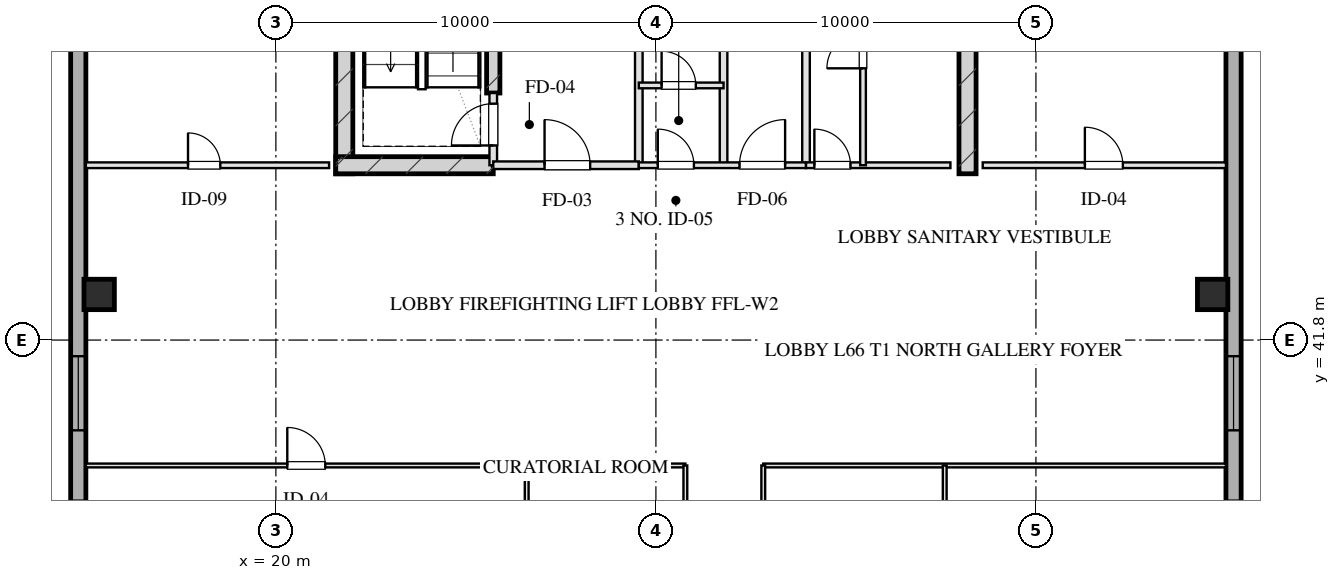
"""IFC4 building model, lengths in metres.
Left out: names, types, materials, properties, quantities, classifications, styles, units other than length and angle.
Written with IfcOpenShell. Run it as: python <this file> out.ifc"""

import sys

from ifc_helpers import new_model, si_unit, direction, frame, frame_2d, origin, origin_2d, place, context, subcontext, project, spatial, rectangle, hollow_rectangle, extrude, element, fill, save


model = new_model("IFC4")
c1 = context("Model", 3, precision=1e-05, world=origin(), true_north=direction((0.0, 1.0)))
c2 = subcontext(c1, "Body", "Model", "MODEL_VIEW")
j1 = project(units=[si_unit("LENGTHUNIT", "METRE"), si_unit("PLANEANGLEUNIT", "RADIAN")], contexts=[c1])
p1 = place(None, origin())
s1 = spatial("IfcSite", under=j1, at=p1, CompositionType="ELEMENT")
p2 = place(p1, origin())
s2 = spatial("IfcBuilding", under=s1, at=p2, CompositionType="ELEMENT")
p3 = place(p2, frame((0.0, 0.0, 244.0)))
s3 = spatial("IfcBuildingStorey", under=s2, at=p3, CompositionType="ELEMENT", Elevation=244.0)
for number, where, z_axis, x_axis in (
    (1, (21.8, 46.175, 0.0), (0.0, 0.0, 1.0), (0.0, 1.0, 0.0)),
    (2, (38.2, 46.175, 0.0), (0.0, 0.0, 1.0), (0.0, 1.0, 0.0)),
):
    element("IfcWall", number, at=place(p3, frame(where, z_axis=z_axis, x_axis=x_axis)), inside=s3, PredefinedType="SHEAR", context=c2, shape_type="SweptSolid", body=[
        extrude(rectangle(XDim=9.33, YDim=0.45, at=frame_2d((4.665, 0.0))), origin(), (0.0, 0.0, 1.0), 3.2),
    ])
p4 = place(p3, frame((25.72, 48.3, 0.0), z_axis=(0.0, 0.0, 1.0), x_axis=(0.0, 1.0, 0.0)))
e3 = element("IfcWall", 3, at=p4, inside=s3, PredefinedType="SHEAR", context=c2, shape_type="SweptSolid", body=[
    extrude(rectangle(XDim=6.98, YDim=0.35, at=frame_2d((3.49, 0.0))), origin(), (0.0, 0.0, 1.0), 3.2),
])
p5 = place(p3, frame((21.575, 46.4, 0.0), z_axis=(0.0, 0.0, 1.0), x_axis=(1.0, 0.0, 0.0)))
e4 = element("IfcWall", 4, at=p5, inside=s3, PredefinedType="SHEAR", context=c2, shape_type="SweptSolid", body=[
    extrude(rectangle(XDim=4.145, YDim=0.45, at=frame_2d((2.073, 0.0))), origin(), (0.0, 0.0, 1.0), 3.2),
])
for number, where, z_axis, x_axis in (
    (5, (15.35, 43.0, 0.0), (0.0, 0.0, 1.0), (1.0, 0.0, 0.0)),
    (6, (44.65, 43.0, 0.0), (0.0, 0.0, 1.0), (1.0, 0.0, 0.0)),
):
    element("IfcColumn", number, at=place(p3, frame(where, z_axis=z_axis, x_axis=x_axis)), inside=s3, PredefinedType="COLUMN", context=c2, shape_type="SweptSolid", body=[
        extrude(hollow_rectangle(XDim=0.8, YDim=0.8, WallThickness=0.028, at=origin_2d()), origin(), (0.0, 0.0, 1.0), 3.201),
    ])
p6 = place(p3, frame((14.8, 13.1, 0.0), z_axis=(0.0, 0.0, 1.0), x_axis=(0.0, 1.0, 0.0)))
e7 = element("IfcWall", 7, at=p6, inside=s3, PredefinedType="SOLIDWALL", context=c2, shape_type="SweptSolid", body=[
    extrude(rectangle(XDim=41.8, YDim=0.4, at=frame_2d((20.9, 0.0))), origin(), (0.0, 0.0, 1.0), 2.36),
])
p7 = place(p6, frame((13.525, 0.0, 0.75)))
e8 = element("IfcOpeningElement", 8, at=p7, cuts=e7, PredefinedType="OPENING", context=c2, shape_type="SweptSolid", body=[
    extrude(rectangle(XDim=1.95, YDim=1.21, at=frame_2d((0.975, 0.605))), frame((0.0, 0.21, 0.0), z_axis=(0.0, -1.0, 0.0), x_axis=(1.0, 0.0, 0.0)), (0.0, 0.0, 1.0), 0.42),
])
p8 = place(p6, frame((17.325, 0.0, 0.75)))
e9 = element("IfcOpeningElement", 9, at=p8, cuts=e7, PredefinedType="OPENING", context=c2, shape_type="SweptSolid", body=[
    extrude(rectangle(XDim=1.95, YDim=1.21, at=frame_2d((0.975, 0.605))), frame((0.0, 0.21, 0.0), z_axis=(0.0, -1.0, 0.0), x_axis=(1.0, 0.0, 0.0)), (0.0, 0.0, 1.0), 0.42),
])
p9 = place(p6, frame((22.525, 0.0, 0.75)))
e10 = element("IfcOpeningElement", 10, at=p9, cuts=e7, PredefinedType="OPENING", context=c2, shape_type="SweptSolid", body=[
    extrude(rectangle(XDim=1.95, YDim=1.21, at=frame_2d((0.975, 0.605))), frame((0.0, 0.21, 0.0), z_axis=(0.0, -1.0, 0.0), x_axis=(1.0, 0.0, 0.0)), (0.0, 0.0, 1.0), 0.42),
])
p10 = place(p6, frame((26.325, 0.0, 0.75)))
e11 = element("IfcOpeningElement", 11, at=p10, cuts=e7, PredefinedType="OPENING", context=c2, shape_type="SweptSolid", body=[
    extrude(rectangle(XDim=1.95, YDim=1.21, at=frame_2d((0.975, 0.605))), frame((0.0, 0.21, 0.0), z_axis=(0.0, -1.0, 0.0), x_axis=(1.0, 0.0, 0.0)), (0.0, 0.0, 1.0), 0.42),
])
p11 = place(p3, frame((45.2, 54.9, 0.0), z_axis=(0.0, 0.0, 1.0), x_axis=(0.0, -1.0, 0.0)))
e12 = element("IfcWall", 12, at=p11, inside=s3, PredefinedType="SOLIDWALL", context=c2, shape_type="SweptSolid", body=[
    extrude(rectangle(XDim=41.8, YDim=0.4, at=frame_2d((20.9, 0.0))), origin(), (0.0, 0.0, 1.0), 2.36),
])
p12 = place(p11, frame((26.325, 0.0, 0.75)))
e13 = element("IfcOpeningElement", 13, at=p12, cuts=e12, PredefinedType="OPENING", context=c2, shape_type="SweptSolid", body=[
    extrude(rectangle(XDim=1.95, YDim=1.21, at=frame_2d((0.975, 0.605))), frame((0.0, 0.21, 0.0), z_axis=(0.0, -1.0, 0.0), x_axis=(1.0, 0.0, 0.0)), (0.0, 0.0, 1.0), 0.42),
])
p13 = place(p11, frame((22.525, 0.0, 0.75)))
e14 = element("IfcOpeningElement", 14, at=p13, cuts=e12, PredefinedType="OPENING", context=c2, shape_type="SweptSolid", body=[
    extrude(rectangle(XDim=1.95, YDim=1.21, at=frame_2d((0.975, 0.605))), frame((0.0, 0.21, 0.0), z_axis=(0.0, -1.0, 0.0), x_axis=(1.0, 0.0, 0.0)), (0.0, 0.0, 1.0), 0.42),
])
p14 = place(p11, frame((17.325, 0.0, 0.75)))
e15 = element("IfcOpeningElement", 15, at=p14, cuts=e12, PredefinedType="OPENING", context=c2, shape_type="SweptSolid", body=[
    extrude(rectangle(XDim=1.95, YDim=1.21, at=frame_2d((0.975, 0.605))), frame((0.0, 0.21, 0.0), z_axis=(0.0, -1.0, 0.0), x_axis=(1.0, 0.0, 0.0)), (0.0, 0.0, 1.0), 0.42),
])
p15 = place(p11, frame((13.525, 0.0, 0.75)))
e16 = element("IfcOpeningElement", 16, at=p15, cuts=e12, PredefinedType="OPENING", context=c2, shape_type="SweptSolid", body=[
    extrude(rectangle(XDim=1.95, YDim=1.21, at=frame_2d((0.975, 0.605))), frame((0.0, 0.21, 0.0), z_axis=(0.0, -1.0, 0.0), x_axis=(1.0, 0.0, 0.0)), (0.0, 0.0, 1.0), 0.42),
])
p16 = place(p3, frame((25.72, 46.4, 0.0), z_axis=(0.0, 0.0, 1.0), x_axis=(0.0, 1.0, 0.0)))
e17 = element("IfcWall", 17, at=p16, inside=s3, PredefinedType="PARTITIONING", context=c2, shape_type="SweptSolid", body=[
    extrude(rectangle(XDim=1.9, YDim=0.2, at=frame_2d((0.95, 0.0))), origin(), (0.0, 0.0, 1.0), 2.925),
])
p17 = place(p16, frame((0.52, 0.0, 0.0)))
e18 = element("IfcOpeningElement", 18, at=p17, cuts=e17, PredefinedType="OPENING", context=c2, shape_type="SweptSolid", body=[
    extrude(rectangle(XDim=1.1, YDim=2.05, at=frame_2d((0.55, 1.025))), frame((0.0, 0.11, 0.0), z_axis=(0.0, -1.0, 0.0), x_axis=(1.0, 0.0, 0.0)), (0.0, 0.0, 1.0), 0.22),
])
p18 = place(p3, frame((29.55, 46.4, 0.0), z_axis=(0.0, 0.0, 1.0), x_axis=(0.0, 1.0, 0.0)))
e19 = element("IfcWall", 19, at=p18, inside=s3, PredefinedType="PARTITIONING", context=c2, shape_type="SweptSolid", body=[
    extrude(rectangle(XDim=8.43, YDim=0.2, at=frame_2d((4.215, 0.0))), origin(), (0.0, 0.0, 1.0), 2.925),
])
p19 = place(p3, frame((25.72, 46.4, 0.0), z_axis=(0.0, 0.0, 1.0), x_axis=(1.0, 0.0, 0.0)))
e20 = element("IfcWall", 20, at=p19, inside=s3, PredefinedType="PARTITIONING", context=c2, shape_type="SweptSolid", body=[
    extrude(rectangle(XDim=3.83, YDim=0.2, at=frame_2d((1.915, 0.0))), origin(), (0.0, 0.0, 1.0), 2.925),
])
p20 = place(p19, frame((1.35, 0.0, 0.0)))
e21 = element("IfcOpeningElement", 21, at=p20, cuts=e20, PredefinedType="OPENING", context=c2, shape_type="SweptSolid", body=[
    extrude(rectangle(XDim=1.2, YDim=2.05, at=frame_2d((0.6, 1.025))), frame((0.0, 0.11, 0.0), z_axis=(0.0, -1.0, 0.0), x_axis=(1.0, 0.0, 0.0)), (0.0, 0.0, 1.0), 0.22),
])
for number, where, z_axis, x_axis in (
    (22, (33.95, 46.4, 0.0), (0.0, 0.0, 1.0), (0.0, 1.0, 0.0)),
    (23, (31.78, 46.4, 0.0), (0.0, 0.0, 1.0), (0.0, 1.0, 0.0)),
):
    element("IfcWall", number, at=place(p3, frame(where, z_axis=z_axis, x_axis=x_axis)), inside=s3, PredefinedType="PARTITIONING", context=c2, shape_type="SweptSolid", body=[
        extrude(rectangle(XDim=8.43, YDim=0.2, at=frame_2d((4.215, 0.0))), origin(), (0.0, 0.0, 1.0), 2.925),
    ])
p21 = place(p3, frame((29.55, 46.4, 0.0), z_axis=(0.0, 0.0, 1.0), x_axis=(1.0, 0.0, 0.0)))
e24 = element("IfcWall", 24, at=p21, inside=s3, PredefinedType="PARTITIONING", context=c2, shape_type="SweptSolid", body=[
    extrude(rectangle(XDim=4.4, YDim=0.15, at=frame_2d((2.2, 0.0))), origin(), (0.0, 0.0, 1.0), 2.925),
])
p22 = place(p21, frame((0.5, 0.0, 0.0)))
e25 = element("IfcOpeningElement", 25, at=p22, cuts=e24, PredefinedType="OPENING", context=c2, shape_type="SweptSolid", body=[
    extrude(rectangle(XDim=0.95, YDim=2.05, at=frame_2d((0.475, 1.025))), frame((0.0, 0.085, 0.0), z_axis=(0.0, -1.0, 0.0), x_axis=(1.0, 0.0, 0.0)), (0.0, 0.0, 1.0), 0.17),
])
p23 = place(p21, frame((2.65, 0.0, 0.0)))
e26 = element("IfcOpeningElement", 26, at=p23, cuts=e24, PredefinedType="OPENING", context=c2, shape_type="SweptSolid", body=[
    extrude(rectangle(XDim=1.2, YDim=2.05, at=frame_2d((0.6, 1.025))), frame((0.0, 0.085, 0.0), z_axis=(0.0, -1.0, 0.0), x_axis=(1.0, 0.0, 0.0)), (0.0, 0.0, 1.0), 0.17),
])
p24 = place(p3, frame((29.55, 48.5, 0.0), z_axis=(0.0, 0.0, 1.0), x_axis=(1.0, 0.0, 0.0)))
e27 = element("IfcWall", 27, at=p24, inside=s3, PredefinedType="PARTITIONING", context=c2, shape_type="SweptSolid", body=[
    extrude(rectangle(XDim=2.23, YDim=0.15, at=frame_2d((1.115, 0.0))), origin(), (0.0, 0.0, 1.0), 2.925),
])
p25 = place(p24, frame((0.6, 0.0, 0.0)))
e28 = element("IfcOpeningElement", 28, at=p25, cuts=e27, PredefinedType="OPENING", context=c2, shape_type="SweptSolid", body=[
    extrude(rectangle(XDim=0.9, YDim=2.05, at=frame_2d((0.45, 1.025))), frame((0.0, 0.085, 0.0), z_axis=(0.0, -1.0, 0.0), x_axis=(1.0, 0.0, 0.0)), (0.0, 0.0, 1.0), 0.17),
])
p26 = place(p3, frame((33.95, 46.4, 0.0), z_axis=(0.0, 0.0, 1.0), x_axis=(1.0, 0.0, 0.0)))
e29 = element("IfcWall", 29, at=p26, inside=s3, PredefinedType="PARTITIONING", context=c2, shape_type="SweptSolid", body=[
    extrude(rectangle(XDim=3.8, YDim=0.15, at=frame_2d((1.9, 0.0))), origin(), (0.0, 0.0, 1.0), 2.925),
])
p27 = place(p26, frame((0.22, 0.0, 0.0)))
e30 = element("IfcOpeningElement", 30, at=p27, cuts=e29, PredefinedType="OPENING", context=c2, shape_type="SweptSolid", body=[
    extrude(rectangle(XDim=0.95, YDim=2.05, at=frame_2d((0.475, 1.025))), frame((0.0, 0.085, 0.0), z_axis=(0.0, -1.0, 0.0), x_axis=(1.0, 0.0, 0.0)), (0.0, 0.0, 1.0), 0.17),
])
p28 = place(p3, frame((35.45, 46.4, 0.0), z_axis=(0.0, 0.0, 1.0), x_axis=(0.0, 1.0, 0.0)))
e31 = element("IfcWall", 31, at=p28, inside=s3, PredefinedType="PARTITIONING", context=c2, shape_type="SweptSolid", body=[
    extrude(rectangle(XDim=8.43, YDim=0.15, at=frame_2d((4.215, 0.0))), origin(), (0.0, 0.0, 1.0), 2.515),
])
p29 = place(p28, frame((2.55, 0.0, 0.0)))
e32 = element("IfcOpeningElement", 32, at=p29, cuts=e31, PredefinedType="OPENING", context=c2, shape_type="SweptSolid", body=[
    extrude(rectangle(XDim=0.95, YDim=2.05, at=frame_2d((0.475, 1.025))), frame((0.0, 0.085, 0.0), z_axis=(0.0, -1.0, 0.0), x_axis=(1.0, 0.0, 0.0)), (0.0, 0.0, 1.0), 0.17),
])
p30 = place(p28, frame((4.7, 0.0, 0.0)))
e33 = element("IfcOpeningElement", 33, at=p30, cuts=e31, PredefinedType="OPENING", context=c2, shape_type="SweptSolid", body=[
    extrude(rectangle(XDim=0.9, YDim=2.05, at=frame_2d((0.45, 1.025))), frame((0.0, 0.085, 0.0), z_axis=(0.0, -1.0, 0.0), x_axis=(1.0, 0.0, 0.0)), (0.0, 0.0, 1.0), 0.17),
])
p31 = place(p28, frame((6.8, 0.0, 0.0)))
e34 = element("IfcOpeningElement", 34, at=p31, cuts=e31, PredefinedType="OPENING", context=c2, shape_type="SweptSolid", body=[
    extrude(rectangle(XDim=0.9, YDim=2.05, at=frame_2d((0.45, 1.025))), frame((0.0, 0.085, 0.0), z_axis=(0.0, -1.0, 0.0), x_axis=(1.0, 0.0, 0.0)), (0.0, 0.0, 1.0), 0.17),
])
p32 = place(p3, frame((15.0, 46.4, 0.0), z_axis=(0.0, 0.0, 1.0), x_axis=(1.0, 0.0, 0.0)))
e35 = element("IfcWall", 35, at=p32, inside=s3, PredefinedType="PARTITIONING", context=c2, shape_type="SweptSolid", body=[
    extrude(rectangle(XDim=6.4, YDim=0.15, at=frame_2d((3.2, 0.0))), origin(), (0.0, 0.0, 1.0), 2.925),
])
p33 = place(p32, frame((2.688, 0.0, 0.0)))
e36 = element("IfcOpeningElement", 36, at=p33, cuts=e35, PredefinedType="OPENING", context=c2, shape_type="SweptSolid", body=[
    extrude(rectangle(XDim=0.85, YDim=2.05, at=frame_2d((0.425, 1.025))), frame((0.0, 0.085, 0.0), z_axis=(0.0, -1.0, 0.0), x_axis=(1.0, 0.0, 0.0)), (0.0, 0.0, 1.0), 0.17),
])
p34 = place(p3, frame((38.6, 46.4, 0.0), z_axis=(0.0, 0.0, 1.0), x_axis=(1.0, 0.0, 0.0)))
e37 = element("IfcWall", 37, at=p34, inside=s3, PredefinedType="PARTITIONING", context=c2, shape_type="SweptSolid", body=[
    extrude(rectangle(XDim=6.4, YDim=0.15, at=frame_2d((3.2, 0.0))), origin(), (0.0, 0.0, 1.0), 2.925),
])
p35 = place(p34, frame((2.688, 0.0, 0.0)))
e38 = element("IfcOpeningElement", 38, at=p35, cuts=e37, PredefinedType="OPENING", context=c2, shape_type="SweptSolid", body=[
    extrude(rectangle(XDim=1.0, YDim=2.05, at=frame_2d((0.5, 1.025))), frame((0.0, 0.085, 0.0), z_axis=(0.0, -1.0, 0.0), x_axis=(1.0, 0.0, 0.0)), (0.0, 0.0, 1.0), 0.17),
])
p36 = place(p3, frame((15.0, 38.5, 0.0), z_axis=(0.0, 0.0, 1.0), x_axis=(1.0, 0.0, 0.0)))
e39 = element("IfcWall", 39, at=p36, inside=s3, PredefinedType="MOVABLE", context=c2, shape_type="SweptSolid", body=[
    extrude(rectangle(XDim=15.775, YDim=0.1, at=frame_2d((7.887, 0.0))), origin(), (0.0, 0.0, 1.0), 2.925),
])
p37 = place(p36, frame((5.3, 0.0, 0.0)))
e40 = element("IfcOpeningElement", 40, at=p37, cuts=e39, PredefinedType="OPENING", context=c2, shape_type="SweptSolid", body=[
    extrude(rectangle(XDim=1.0, YDim=2.05, at=frame_2d((0.5, 1.025))), frame((0.0, 0.06, 0.0), z_axis=(0.0, -1.0, 0.0), x_axis=(1.0, 0.0, 0.0)), (0.0, 0.0, 1.0), 0.12),
])
p38 = place(p3, frame((32.825, 38.5, 0.0), z_axis=(0.0, 0.0, 1.0), x_axis=(1.0, 0.0, 0.0)))
e41 = element("IfcWall", 41, at=p38, inside=s3, PredefinedType="MOVABLE", context=c2, shape_type="SweptSolid", body=[
    extrude(rectangle(XDim=12.175, YDim=0.1, at=frame_2d((6.087, 0.0))), origin(), (0.0, 0.0, 1.0), 2.925),
])
p39 = place(p3, frame((30.775, 29.5, 0.0), z_axis=(0.0, 0.0, 1.0), x_axis=(0.0, 1.0, 0.0)))
e42 = element("IfcWall", 42, at=p39, inside=s3, PredefinedType="MOVABLE", context=c2, shape_type="SweptSolid", body=[
    extrude(rectangle(XDim=9.0, YDim=0.1, at=frame_2d((4.5, 0.0))), origin(), (0.0, 0.0, 1.0), 2.925),
])
p40 = place(p39, frame((1.2, 0.0, 0.0)))
e43 = element("IfcOpeningElement", 43, at=p40, cuts=e42, PredefinedType="OPENING", context=c2, shape_type="SweptSolid", body=[
    extrude(rectangle(XDim=1.0, YDim=2.05, at=frame_2d((0.5, 1.025))), frame((0.0, 0.06, 0.0), z_axis=(0.0, -1.0, 0.0), x_axis=(1.0, 0.0, 0.0)), (0.0, 0.0, 1.0), 0.12),
])
p41 = place(p39, frame((4.035, 0.0, 0.0)))
e44 = element("IfcOpeningElement", 44, at=p41, cuts=e42, PredefinedType="OPENING", context=c2, shape_type="SweptSolid", body=[
    extrude(rectangle(XDim=1.0, YDim=2.05, at=frame_2d((0.5, 1.025))), frame((0.0, 0.06, 0.0), z_axis=(0.0, -1.0, 0.0), x_axis=(1.0, 0.0, 0.0)), (0.0, 0.0, 1.0), 0.12),
])
p42 = place(p39, frame((6.835, 0.0, 0.0)))
e45 = element("IfcOpeningElement", 45, at=p42, cuts=e42, PredefinedType="OPENING", context=c2, shape_type="SweptSolid", body=[
    extrude(rectangle(XDim=1.0, YDim=2.05, at=frame_2d((0.5, 1.025))), frame((0.0, 0.06, 0.0), z_axis=(0.0, -1.0, 0.0), x_axis=(1.0, 0.0, 0.0)), (0.0, 0.0, 1.0), 0.12),
])
p43 = place(p3, frame((32.825, 29.5, 0.0), z_axis=(0.0, 0.0, 1.0), x_axis=(0.0, 1.0, 0.0)))
e46 = element("IfcWall", 46, at=p43, inside=s3, PredefinedType="MOVABLE", context=c2, shape_type="SweptSolid", body=[
    extrude(rectangle(XDim=9.0, YDim=0.1, at=frame_2d((4.5, 0.0))), origin(), (0.0, 0.0, 1.0), 2.925),
])
p44 = place(p43, frame((4.0, 0.0, 0.0)))
e47 = element("IfcOpeningElement", 47, at=p44, cuts=e46, PredefinedType="OPENING", context=c2, shape_type="SweptSolid", body=[
    extrude(rectangle(XDim=1.0, YDim=2.05, at=frame_2d((0.5, 1.025))), frame((0.0, 0.06, 0.0), z_axis=(0.0, -1.0, 0.0), x_axis=(1.0, 0.0, 0.0)), (0.0, 0.0, 1.0), 0.12),
])
p45 = place(p3, frame((26.6, 35.17, 0.0), z_axis=(0.0, 0.0, 1.0), x_axis=(0.0, 1.0, 0.0)))
e48 = element("IfcWall", 48, at=p45, inside=s3, PredefinedType="MOVABLE", context=c2, shape_type="SweptSolid", body=[
    extrude(rectangle(XDim=3.33, YDim=0.1, at=frame_2d((1.665, 0.0))), origin(), (0.0, 0.0, 1.0), 2.925),
])
p46 = place(p3, frame((37.6, 29.5, 0.0), z_axis=(0.0, 0.0, 1.0), x_axis=(0.0, 1.0, 0.0)))
e49 = element("IfcWall", 49, at=p46, inside=s3, PredefinedType="MOVABLE", context=c2, shape_type="SweptSolid", body=[
    extrude(rectangle(XDim=9.0, YDim=0.1, at=frame_2d((4.5, 0.0))), origin(), (0.0, 0.0, 1.0), 2.925),
])
p47 = place(p10, origin())
e50 = element("IfcWindow", 50, at=p47, inside=s3, PartitioningType="TRIPLE_PANEL_VERTICAL", PredefinedType="WINDOW", context=c2, shape_type="SweptSolid", body=[
    extrude(rectangle(XDim=1.95, YDim=1.21, at=frame_2d((0.975, 0.605))), frame((0.0, 0.03, 0.0), z_axis=(0.0, -1.0, 0.0), x_axis=(1.0, 0.0, 0.0)), (0.0, 0.0, 1.0), 0.06),
])
fill(e11, e50)
p48 = place(p15, origin())
e51 = element("IfcWindow", 51, at=p48, inside=s3, PartitioningType="TRIPLE_PANEL_VERTICAL", PredefinedType="WINDOW", context=c2, shape_type="SweptSolid", body=[
    extrude(rectangle(XDim=1.95, YDim=1.21, at=frame_2d((0.975, 0.605))), frame((0.0, 0.03, 0.0), z_axis=(0.0, -1.0, 0.0), x_axis=(1.0, 0.0, 0.0)), (0.0, 0.0, 1.0), 0.06),
])
fill(e16, e51)
p49 = place(p17, origin())
e52 = element("IfcDoor", 52, at=p49, inside=s3, OperationType="SINGLE_SWING_LEFT", PredefinedType="DOOR", context=c2, shape_type="SweptSolid", body=[
    extrude(rectangle(XDim=1.1, YDim=2.05, at=frame_2d((0.55, 1.025))), frame((0.0, 0.025, 0.0), z_axis=(0.0, -1.0, 0.0), x_axis=(1.0, 0.0, 0.0)), (0.0, 0.0, 1.0), 0.05),
])
fill(e18, e52)
p50 = place(p20, origin())
e53 = element("IfcDoor", 53, at=p50, inside=s3, OperationType="SINGLE_SWING_LEFT", PredefinedType="DOOR", context=c2, shape_type="SweptSolid", body=[
    extrude(rectangle(XDim=1.2, YDim=2.05, at=frame_2d((0.6, 1.025))), frame((0.0, 0.025, 0.0), z_axis=(0.0, -1.0, 0.0), x_axis=(1.0, 0.0, 0.0)), (0.0, 0.0, 1.0), 0.05),
])
fill(e21, e53)
p51 = place(p22, origin())
e54 = element("IfcDoor", 54, at=p51, inside=s3, OperationType="SINGLE_SWING_LEFT", PredefinedType="DOOR", context=c2, shape_type="SweptSolid", body=[
    extrude(rectangle(XDim=0.95, YDim=2.05, at=frame_2d((0.475, 1.025))), frame((0.0, 0.025, 0.0), z_axis=(0.0, -1.0, 0.0), x_axis=(1.0, 0.0, 0.0)), (0.0, 0.0, 1.0), 0.05),
])
fill(e25, e54)
p52 = place(p23, origin())
e55 = element("IfcDoor", 55, at=p52, inside=s3, OperationType="SINGLE_SWING_RIGHT", PredefinedType="DOOR", context=c2, shape_type="SweptSolid", body=[
    extrude(rectangle(XDim=1.2, YDim=2.05, at=frame_2d((0.6, 1.025))), frame((0.0, 0.025, 0.0), z_axis=(0.0, -1.0, 0.0), x_axis=(1.0, 0.0, 0.0)), (0.0, 0.0, 1.0), 0.05),
])
fill(e26, e55)
p53 = place(p25, origin())
e56 = element("IfcDoor", 56, at=p53, inside=s3, OperationType="SINGLE_SWING_LEFT", PredefinedType="DOOR", context=c2, shape_type="SweptSolid", body=[
    extrude(rectangle(XDim=0.9, YDim=2.05, at=frame_2d((0.45, 1.025))), frame((0.0, 0.025, 0.0), z_axis=(0.0, -1.0, 0.0), x_axis=(1.0, 0.0, 0.0)), (0.0, 0.0, 1.0), 0.05),
])
fill(e28, e56)
p54 = place(p27, origin())
e57 = element("IfcDoor", 57, at=p54, inside=s3, OperationType="SINGLE_SWING_LEFT", PredefinedType="DOOR", context=c2, shape_type="SweptSolid", body=[
    extrude(rectangle(XDim=0.95, YDim=2.05, at=frame_2d((0.475, 1.025))), frame((0.0, 0.025, 0.0), z_axis=(0.0, -1.0, 0.0), x_axis=(1.0, 0.0, 0.0)), (0.0, 0.0, 1.0), 0.05),
])
fill(e30, e57)
p55 = place(p29, origin())
e58 = element("IfcDoor", 58, at=p55, inside=s3, OperationType="SINGLE_SWING_LEFT", PredefinedType="DOOR", context=c2, shape_type="SweptSolid", body=[
    extrude(rectangle(XDim=0.95, YDim=2.05, at=frame_2d((0.475, 1.025))), frame((0.0, 0.025, 0.0), z_axis=(0.0, -1.0, 0.0), x_axis=(1.0, 0.0, 0.0)), (0.0, 0.0, 1.0), 0.05),
])
fill(e32, e58)
p56 = place(p33, origin())
e59 = element("IfcDoor", 59, at=p56, inside=s3, OperationType="SINGLE_SWING_LEFT", PredefinedType="DOOR", context=c2, shape_type="SweptSolid", body=[
    extrude(rectangle(XDim=0.85, YDim=2.05, at=frame_2d((0.425, 1.025))), frame((0.0, 0.025, 0.0), z_axis=(0.0, -1.0, 0.0), x_axis=(1.0, 0.0, 0.0)), (0.0, 0.0, 1.0), 0.05),
])
fill(e36, e59)
p57 = place(p35, origin())
e60 = element("IfcDoor", 60, at=p57, inside=s3, OperationType="SINGLE_SWING_LEFT", PredefinedType="DOOR", context=c2, shape_type="SweptSolid", body=[
    extrude(rectangle(XDim=1.0, YDim=2.05, at=frame_2d((0.5, 1.025))), frame((0.0, 0.025, 0.0), z_axis=(0.0, -1.0, 0.0), x_axis=(1.0, 0.0, 0.0)), (0.0, 0.0, 1.0), 0.05),
])
fill(e38, e60)
p58 = place(p37, origin())
e61 = element("IfcDoor", 61, at=p58, inside=s3, OperationType="SINGLE_SWING_LEFT", PredefinedType="DOOR", context=c2, shape_type="SweptSolid", body=[
    extrude(rectangle(XDim=1.0, YDim=2.05, at=frame_2d((0.5, 1.025))), frame((0.0, 0.025, 0.0), z_axis=(0.0, -1.0, 0.0), x_axis=(1.0, 0.0, 0.0)), (0.0, 0.0, 1.0), 0.05),
])
fill(e40, e61)
save(model, sys.argv[1])
